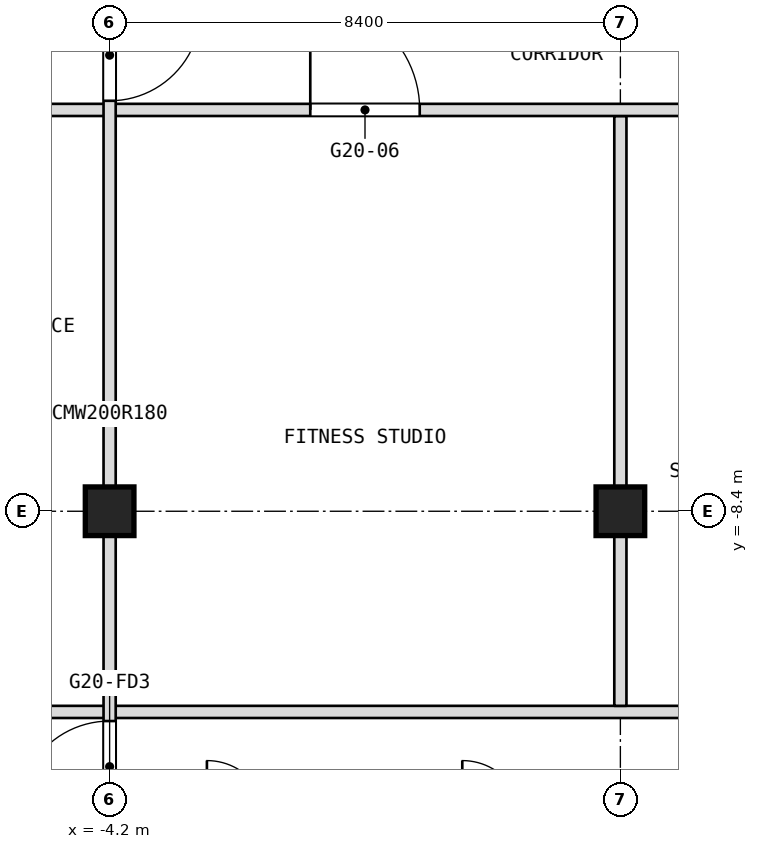
"""IFC4 building model, lengths in metres.
Left out: names, types, materials, properties, quantities, classifications, styles, units other than length and angle.
Written with IfcOpenShell. Run it as: python <this file> out.ifc"""

import sys

from ifc_helpers import new_model, si_unit, direction, frame, frame_2d, origin, origin_2d, place, context, subcontext, project, spatial, rectangle, extrude, element, fill, save


model = new_model("IFC4")
c1 = context("Model", 3, precision=1e-05, world=origin(), true_north=direction((0.0, 1.0)))
c2 = subcontext(c1, "Body", "Model", "MODEL_VIEW")
j1 = project(units=[si_unit("LENGTHUNIT", "METRE"), si_unit("PLANEANGLEUNIT", "RADIAN")], contexts=[c1])
p1 = place(None, origin())
s1 = spatial("IfcSite", under=j1, at=p1, CompositionType="ELEMENT")
p2 = place(p1, origin())
s2 = spatial("IfcBuilding", under=s1, at=p2, CompositionType="ELEMENT")
p3 = place(p2, frame((0.0, 0.0, 234.5)))
s3 = spatial("IfcBuildingStorey", under=s2, at=p3, CompositionType="ELEMENT", Elevation=234.5)
for number, where, z_axis, x_axis in (
    (1, (-4.2, -8.4, 0.0), (0.0, 0.0, 1.0), (1.0, 0.0, 0.0)),
    (2, (4.2, -8.4, 0.0), (0.0, 0.0, 1.0), (1.0, 0.0, 0.0)),
):
    element("IfcColumn", number, at=place(p3, frame(where, z_axis=z_axis, x_axis=x_axis)), inside=s3, PredefinedType="COLUMN", context=c2, shape_type="SweptSolid", body=[
        extrude(rectangle(XDim=0.8, YDim=0.8, at=origin_2d()), origin(), (0.0, 0.0, 1.0), 3.6),
    ])
p4 = place(p3, frame((-7.3, -11.7, 0.0), z_axis=(0.0, 0.0, 1.0), x_axis=(1.0, 0.0, 0.0)))
e3 = element("IfcWall", 3, at=p4, inside=s3, PredefinedType="PARTITIONING", context=c2, shape_type="SweptSolid", body=[
    extrude(rectangle(XDim=14.6, YDim=0.2, at=frame_2d((7.3, 0.0))), origin(), (0.0, 0.0, 1.0), 3.34),
])
p5 = place(p3, frame((4.2, -11.6, 0.0), z_axis=(0.0, 0.0, 1.0), x_axis=(0.0, 1.0, 0.0)))
e4 = element("IfcWall", 4, at=p5, inside=s3, PredefinedType="PARTITIONING", context=c2, shape_type="SweptSolid", body=[
    extrude(rectangle(XDim=9.7, YDim=0.2, at=frame_2d((4.85, 0.0))), origin(), (0.0, 0.0, 1.0), 3.34),
])
p6 = place(p3, frame((-16.9, -1.8, 0.0), z_axis=(0.0, 0.0, 1.0), x_axis=(1.0, 0.0, 0.0)))
e5 = element("IfcWall", 5, at=p6, inside=s3, PredefinedType="PARTITIONING", context=c2, shape_type="SweptSolid", body=[
    extrude(rectangle(XDim=33.8, YDim=0.2, at=frame_2d((16.9, 0.0))), origin(), (0.0, 0.0, 1.0), 3.34),
])
p7 = place(p6, frame((1.7, 0.0, 0.0)))
e6 = element("IfcOpeningElement", 6, at=p7, cuts=e5, PredefinedType="OPENING", context=c2, shape_type="SweptSolid", body=[
    extrude(rectangle(XDim=1.0, YDim=2.1, at=frame_2d((0.5, 1.05))), frame((0.0, 0.1, 0.0), z_axis=(0.0, -1.0, 0.0), x_axis=(1.0, 0.0, 0.0)), (0.0, 0.0, 1.0), 0.2),
])
p8 = place(p6, frame((5.9, 0.0, 0.0)))
e7 = element("IfcOpeningElement", 7, at=p8, cuts=e5, PredefinedType="OPENING", context=c2, shape_type="SweptSolid", body=[
    extrude(rectangle(XDim=1.0, YDim=2.1, at=frame_2d((0.5, 1.05))), frame((0.0, 0.1, 0.0), z_axis=(0.0, -1.0, 0.0), x_axis=(1.0, 0.0, 0.0)), (0.0, 0.0, 1.0), 0.2),
])
p9 = place(p6, frame((10.1, 0.0, 0.0)))
e8 = element("IfcOpeningElement", 8, at=p9, cuts=e5, PredefinedType="OPENING", context=c2, shape_type="SweptSolid", body=[
    extrude(rectangle(XDim=1.0, YDim=2.1, at=frame_2d((0.5, 1.05))), frame((0.0, 0.1, 0.0), z_axis=(0.0, -1.0, 0.0), x_axis=(1.0, 0.0, 0.0)), (0.0, 0.0, 1.0), 0.2),
])
p10 = place(p6, frame((16.0, 0.0, 0.0)))
e9 = element("IfcOpeningElement", 9, at=p10, cuts=e5, PredefinedType="OPENING", context=c2, shape_type="SweptSolid", body=[
    extrude(rectangle(XDim=1.8, YDim=2.1, at=frame_2d((0.9, 1.05))), frame((0.0, 0.1, 0.0), z_axis=(0.0, -1.0, 0.0), x_axis=(1.0, 0.0, 0.0)), (0.0, 0.0, 1.0), 0.2),
])
p11 = place(p6, frame((22.7, 0.0, 0.0)))
e10 = element("IfcOpeningElement", 10, at=p11, cuts=e5, PredefinedType="OPENING", context=c2, shape_type="SweptSolid", body=[
    extrude(rectangle(XDim=1.0, YDim=2.1, at=frame_2d((0.5, 1.05))), frame((0.0, 0.1, 0.0), z_axis=(0.0, -1.0, 0.0), x_axis=(1.0, 0.0, 0.0)), (0.0, 0.0, 1.0), 0.2),
])
p12 = place(p6, frame((26.9, 0.0, 0.0)))
e11 = element("IfcOpeningElement", 11, at=p12, cuts=e5, PredefinedType="OPENING", context=c2, shape_type="SweptSolid", body=[
    extrude(rectangle(XDim=1.0, YDim=2.1, at=frame_2d((0.5, 1.05))), frame((0.0, 0.1, 0.0), z_axis=(0.0, -1.0, 0.0), x_axis=(1.0, 0.0, 0.0)), (0.0, 0.0, 1.0), 0.2),
])
p13 = place(p6, frame((31.1, 0.0, 0.0)))
e12 = element("IfcOpeningElement", 12, at=p13, cuts=e5, PredefinedType="OPENING", context=c2, shape_type="SweptSolid", body=[
    extrude(rectangle(XDim=1.0, YDim=2.1, at=frame_2d((0.5, 1.05))), frame((0.0, 0.1, 0.0), z_axis=(0.0, -1.0, 0.0), x_axis=(1.0, 0.0, 0.0)), (0.0, 0.0, 1.0), 0.2),
])
p14 = place(p3, frame((-4.2, -13.6, 0.0), z_axis=(0.0, 0.0, 1.0), x_axis=(0.0, 1.0, 0.0)))
e13 = element("IfcWall", 13, at=p14, inside=s3, PredefinedType="PARTITIONING", context=c2, shape_type="SweptSolid", body=[
    extrude(rectangle(XDim=13.6, YDim=0.2, at=frame_2d((6.8, 0.0))), origin(), (0.0, 0.0, 1.0), 3.34),
])
p15 = place(p14, frame((11.95, 0.0, 0.0)))
e14 = element("IfcOpeningElement", 14, at=p15, cuts=e13, PredefinedType="OPENING", context=c2, shape_type="SweptSolid", body=[
    extrude(rectangle(XDim=1.5, YDim=2.1, at=frame_2d((0.75, 1.05))), frame((0.0, 0.1, 0.0), z_axis=(0.0, -1.0, 0.0), x_axis=(1.0, 0.0, 0.0)), (0.0, 0.0, 1.0), 0.2),
])
p16 = place(p14, frame((0.25, 0.0, 0.0)))
e15 = element("IfcOpeningElement", 15, at=p16, cuts=e13, PredefinedType="OPENING", context=c2, shape_type="SweptSolid", body=[
    extrude(rectangle(XDim=1.5, YDim=2.1, at=frame_2d((0.75, 1.05))), frame((0.0, 0.1, 0.0), z_axis=(0.0, -1.0, 0.0), x_axis=(1.0, 0.0, 0.0)), (0.0, 0.0, 1.0), 0.2),
])
p17 = place(p10, origin())
e16 = element("IfcDoor", 16, at=p17, inside=s3, OperationType="DOUBLE_DOOR_SINGLE_SWING", PredefinedType="DOOR", context=c2, shape_type="SweptSolid", body=[
    extrude(rectangle(XDim=1.8, YDim=2.1, at=frame_2d((0.9, 1.05))), frame((0.0, 0.025, 0.0), z_axis=(0.0, -1.0, 0.0), x_axis=(1.0, 0.0, 0.0)), (0.0, 0.0, 1.0), 0.05),
])
fill(e9, e16)
p18 = place(p15, origin())
e17 = element("IfcDoor", 17, at=p18, inside=s3, OperationType="DOUBLE_DOOR_DOUBLE_SWING", PredefinedType="DOOR", context=c2, shape_type="SweptSolid", body=[
    extrude(rectangle(XDim=1.5, YDim=2.1, at=frame_2d((0.75, 1.05))), frame((0.0, 0.025, 0.0), z_axis=(0.0, -1.0, 0.0), x_axis=(1.0, 0.0, 0.0)), (0.0, 0.0, 1.0), 0.05),
])
fill(e14, e17)
p19 = place(p16, origin())
e18 = element("IfcDoor", 18, at=p19, inside=s3, OperationType="DOUBLE_DOOR_DOUBLE_SWING", PredefinedType="DOOR", context=c2, shape_type="SweptSolid", body=[
    extrude(rectangle(XDim=1.5, YDim=2.1, at=frame_2d((0.75, 1.05))), frame((0.0, 0.025, 0.0), z_axis=(0.0, -1.0, 0.0), x_axis=(1.0, 0.0, 0.0)), (0.0, 0.0, 1.0), 0.05),
])
fill(e15, e18)
save(model, sys.argv[1])
